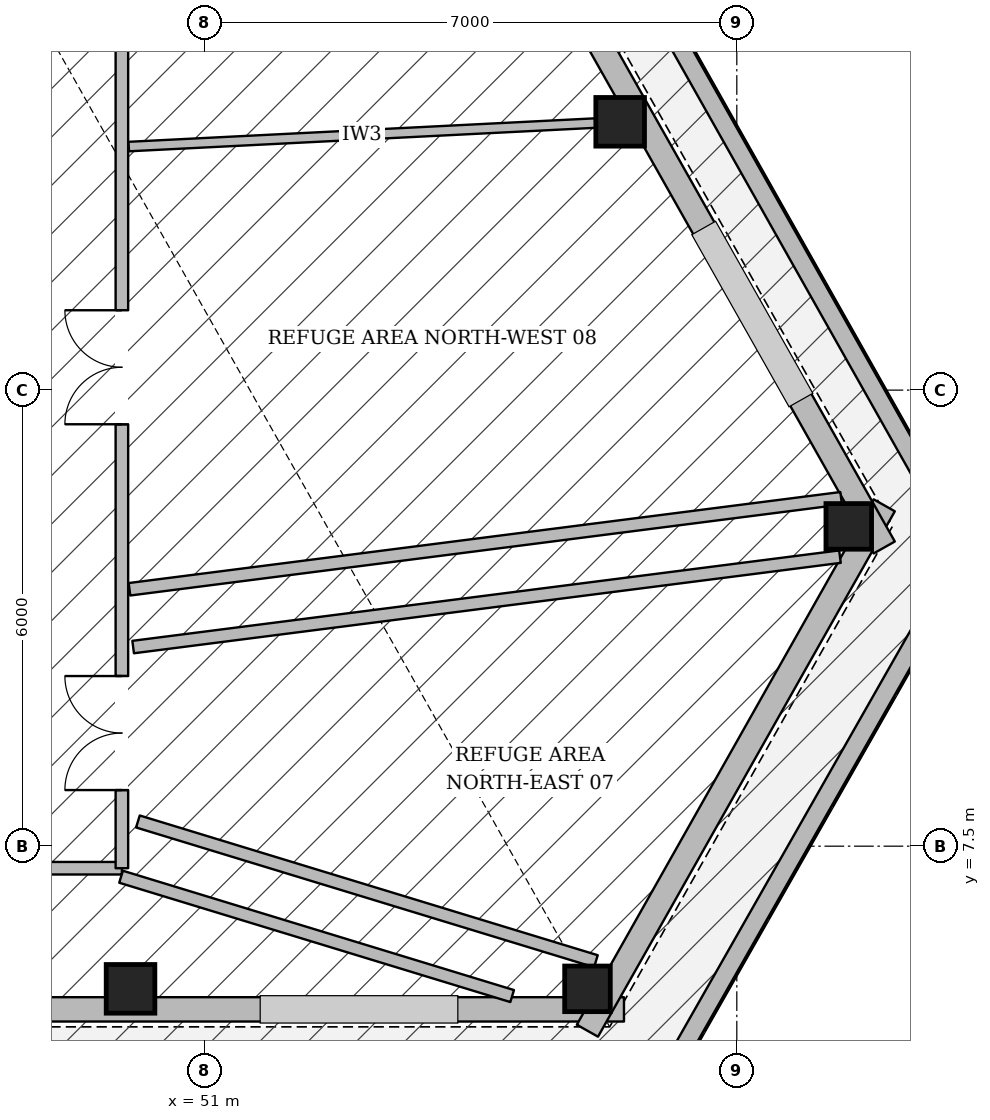
"""IFC4 building model, lengths in metres.
Left out: names, types, materials, properties, quantities, classifications, styles, units other than length and angle.
Written with IfcOpenShell. Run it as: python <this file> out.ifc"""

import sys

from ifc_helpers import new_model, si_unit, direction, frame, frame_2d, origin, origin_2d, place, context, subcontext, project, spatial, rectangle, hollow_rectangle, extrude, element, fill, save


model = new_model("IFC4")
c1 = context("Model", 3, precision=1e-05, world=origin(), true_north=direction((0.0, 1.0)))
c2 = subcontext(c1, "Body", "Model", "MODEL_VIEW")
j1 = project(units=[si_unit("LENGTHUNIT", "METRE"), si_unit("PLANEANGLEUNIT", "RADIAN")], contexts=[c1])
p1 = place(None, origin())
s1 = spatial("IfcSite", under=j1, at=p1, CompositionType="ELEMENT")
p2 = place(p1, origin())
s2 = spatial("IfcBuilding", under=s1, at=p2, CompositionType="ELEMENT")
p3 = place(p2, frame((0.0, 0.0, 234.3)))
s3 = spatial("IfcBuildingStorey", under=s2, at=p3, CompositionType="ELEMENT", Elevation=234.3)
p4 = place(p3, frame((50.024, 5.623, 0.0), z_axis=(0.0, 0.0, 1.0), x_axis=(1.0, 0.0, 0.0)))
e1 = element("IfcColumn", 1, at=p4, inside=s3, PredefinedType="COLUMN", context=c2, shape_type="SweptSolid", body=[
    extrude(hollow_rectangle(XDim=0.64, YDim=0.64, WallThickness=0.028, at=origin_2d()), origin(), (0.0, 0.0, 1.0), 4.96),
])
for number, where, z_axis, x_axis in (
    (2, (56.035, 5.623, 0.0), (0.0, 0.0, 1.0), (1.0, 0.0, 0.0)),
    (3, (59.473, 11.707, 0.0), (0.0, 0.0, 1.0), (1.0, 0.0, 0.0)),
):
    element("IfcColumn", number, at=place(p3, frame(where, z_axis=z_axis, x_axis=x_axis)), inside=s3, PredefinedType="COLUMN", context=c2, shape_type="SweptSolid", body=[
        extrude(hollow_rectangle(XDim=0.6, YDim=0.6, WallThickness=0.028, at=origin_2d()), origin(), (0.0, 0.0, 1.0), 4.96),
    ])
p5 = place(p3, frame((56.465, 17.03, 0.0), z_axis=(0.0, 0.0, 1.0), x_axis=(1.0, 0.0, 0.0)))
e4 = element("IfcColumn", 4, at=p5, inside=s3, PredefinedType="COLUMN", context=c2, shape_type="SweptSolid", body=[
    extrude(hollow_rectangle(XDim=0.64, YDim=0.64, WallThickness=0.028, at=origin_2d()), origin(), (0.0, 0.0, 1.0), 4.96),
])
p6 = place(p3, frame((56.516, 5.353, 0.0), z_axis=(0.0, 0.0, 1.0), x_axis=(-1.0, 0.0, 0.0)))
e5 = element("IfcWall", 5, at=p6, inside=s3, PredefinedType="STANDARD", context=c2, shape_type="SweptSolid", body=[
    extrude(rectangle(XDim=37.031, YDim=0.32, at=frame_2d((18.516, 0.0))), origin(), (0.0, 0.0, 1.0), 3.652),
])
p7 = place(p3, frame((59.94, 11.984, 0.0), z_axis=(0.0, 0.0, 1.0), x_axis=(-0.491920449469, -0.870640150346, 0.0)))
e6 = element("IfcWall", 6, at=p7, inside=s3, PredefinedType="STANDARD", context=c2, shape_type="SweptSolid", body=[
    extrude(rectangle(XDim=7.939, YDim=0.32, at=frame_2d((3.969, 0.0))), origin(), (0.0, 0.0, 1.0), 3.652),
])
p8 = place(p3, frame((41.427, 44.195, 0.0), z_axis=(0.0, 0.0, 1.0), x_axis=(0.491919583937, -0.87064063938, 0.0)))
e7 = element("IfcWall", 7, at=p8, inside=s3, PredefinedType="STANDARD", context=c2, shape_type="SweptSolid", body=[
    extrude(rectangle(XDim=37.633, YDim=0.32, at=frame_2d((18.816, 0.0))), origin(), (0.0, 0.0, 1.0), 3.652),
])
p9 = place(p3, frame((56.976, 4.282, 0.0), z_axis=(0.0, 0.0, 1.0), x_axis=(0.49469634297, 0.869065894079, 0.0)))
e8 = element("IfcWall", 8, at=p9, inside=s3, PredefinedType="PARAPET", context=c2, shape_type="SweptSolid", body=[
    extrude(rectangle(XDim=8.333, YDim=0.24, at=frame_2d((4.167, 0.0))), origin(), (0.0, 0.0, 1.0), 1.25),
])
p10 = place(p3, frame((61.098, 11.212, 0.0), z_axis=(0.0, 0.0, 1.0), x_axis=(-0.491296283938, 0.870992515117, 0.0)))
e9 = element("IfcWall", 9, at=p10, inside=s3, PredefinedType="PARAPET", context=c2, shape_type="SweptSolid", body=[
    extrude(rectangle(XDim=39.283, YDim=0.24, at=frame_2d((19.642, 0.0))), origin(), (0.0, 0.0, 1.0), 1.25),
])
p11 = place(p3, frame((26.09, 7.21, 0.0), z_axis=(0.0, 0.0, 1.0), x_axis=(1.0, 0.0, 0.0)))
e10 = element("IfcWall", 10, at=p11, inside=s3, PredefinedType="PARTITIONING", context=c2, shape_type="SweptSolid", body=[
    extrude(rectangle(XDim=23.82, YDim=0.165, at=frame_2d((11.91, 0.0))), origin(), (0.0, 0.0, 1.0), 4.96),
])
p12 = place(p11, frame((11.16, 0.0, 0.0)))
e11 = element("IfcOpeningElement", 11, at=p12, cuts=e10, PredefinedType="OPENING", context=c2, shape_type="SweptSolid", body=[
    extrude(rectangle(XDim=1.5, YDim=2.25, at=frame_2d((0.75, 1.125))), frame((0.0, 0.093, 0.0), z_axis=(0.0, -1.0, 0.0), x_axis=(1.0, 0.0, 0.0)), (0.0, 0.0, 1.0), 0.185),
])
p13 = place(p3, frame((49.91, 7.21, 0.0), z_axis=(0.0, 0.0, 1.0), x_axis=(0.0, 1.0, 0.0)))
e12 = element("IfcWall", 12, at=p13, inside=s3, PredefinedType="PARTITIONING", context=c2, shape_type="SweptSolid", body=[
    extrude(rectangle(XDim=17.78, YDim=0.165, at=frame_2d((8.89, 0.0))), origin(), (0.0, 0.0, 1.0), 4.699),
])
p14 = place(p13, frame((12.803, 0.0, 0.0)))
e13 = element("IfcOpeningElement", 13, at=p14, cuts=e12, PredefinedType="OPENING", context=c2, shape_type="SweptSolid", body=[
    extrude(rectangle(XDim=1.5, YDim=2.25, at=frame_2d((0.75, 1.125))), frame((0.0, 0.093, 0.0), z_axis=(0.0, -1.0, 0.0), x_axis=(1.0, 0.0, 0.0)), (0.0, 0.0, 1.0), 0.185),
])
p15 = place(p13, frame((1.028, 0.0, 0.0)))
e14 = element("IfcOpeningElement", 14, at=p15, cuts=e12, PredefinedType="OPENING", context=c2, shape_type="SweptSolid", body=[
    extrude(rectangle(XDim=1.5, YDim=2.25, at=frame_2d((0.75, 1.125))), frame((0.0, 0.093, 0.0), z_axis=(0.0, -1.0, 0.0), x_axis=(1.0, 0.0, 0.0)), (0.0, 0.0, 1.0), 0.185),
])
p16 = place(p13, frame((5.841, 0.0, 0.0)))
e15 = element("IfcOpeningElement", 15, at=p16, cuts=e12, PredefinedType="OPENING", context=c2, shape_type="SweptSolid", body=[
    extrude(rectangle(XDim=1.5, YDim=2.25, at=frame_2d((0.75, 1.125))), frame((0.0, 0.093, 0.0), z_axis=(0.0, -1.0, 0.0), x_axis=(1.0, 0.0, 0.0)), (0.0, 0.0, 1.0), 0.185),
])
p17 = place(p3, frame((50.121, 7.825, 0.0), z_axis=(0.0, 0.0, 1.0), x_axis=(0.956485946224, -0.291778399948, 0.0)))
e16 = element("IfcWall", 16, at=p17, inside=s3, PredefinedType="PARTITIONING", context=c2, shape_type="SweptSolid", body=[
    extrude(rectangle(XDim=6.3, YDim=0.165, at=frame_2d((3.15, 0.0))), origin(), (0.0, 0.0, 1.0), 4.96),
])
p18 = place(p3, frame((49.899, 7.098, 0.0), z_axis=(0.0, 0.0, 1.0), x_axis=(0.956485702971, -0.291779197362, 0.0)))
e17 = element("IfcWall", 17, at=p18, inside=s3, PredefinedType="PARTITIONING", context=c2, shape_type="SweptSolid", body=[
    extrude(rectangle(XDim=5.379, YDim=0.165, at=frame_2d((2.69, 0.0))), origin(), (0.0, 0.0, 1.0), 3.655),
])
p19 = place(p3, frame((50.01, 10.88, 0.0), z_axis=(0.0, 0.0, 1.0), x_axis=(0.991919681507, 0.126867432537, 0.0)))
e18 = element("IfcWall", 18, at=p19, inside=s3, PredefinedType="PARTITIONING", context=c2, shape_type="SweptSolid", body=[
    extrude(rectangle(XDim=9.439, YDim=0.165, at=frame_2d((4.719, 0.0))), origin(), (0.0, 0.0, 1.0), 4.96),
])
p20 = place(p3, frame((50.058, 10.12, 0.0), z_axis=(0.0, 0.0, 1.0), x_axis=(0.991918429115, 0.126877224045, 0.0)))
e19 = element("IfcWall", 19, at=p20, inside=s3, PredefinedType="PARTITIONING", context=c2, shape_type="SweptSolid", body=[
    extrude(rectangle(XDim=9.375, YDim=0.165, at=frame_2d((4.688, 0.0))), origin(), (0.0, 0.0, 1.0), 4.699),
])
p21 = place(p3, frame((50.0, 16.704, 0.0), z_axis=(0.0, 0.0, 1.0), x_axis=(0.998734141149, 0.050300251529, 0.0)))
e20 = element("IfcWall", 20, at=p21, inside=s3, PredefinedType="PARTITIONING", context=c2, shape_type="SweptSolid", body=[
    extrude(rectangle(XDim=6.145, YDim=0.125, at=frame_2d((3.072, 0.0))), origin(), (0.0, 0.0, 1.0), 3.655),
])
p22 = place(p15, origin())
e21 = element("IfcDoor", 21, at=p22, inside=s3, OperationType="DOUBLE_DOOR_SINGLE_SWING", PredefinedType="DOOR", context=c2, shape_type="SweptSolid", body=[
    extrude(rectangle(XDim=1.5, YDim=2.25, at=frame_2d((0.75, 1.125))), frame((0.0, 0.025, 0.0), z_axis=(0.0, -1.0, 0.0), x_axis=(1.0, 0.0, 0.0)), (0.0, 0.0, 1.0), 0.05),
])
fill(e14, e21)
p23 = place(p16, origin())
e22 = element("IfcDoor", 22, at=p23, inside=s3, OperationType="DOUBLE_DOOR_SINGLE_SWING", PredefinedType="DOOR", context=c2, shape_type="SweptSolid", body=[
    extrude(rectangle(XDim=1.5, YDim=2.25, at=frame_2d((0.75, 1.125))), frame((0.0, 0.025, 0.0), z_axis=(0.0, -1.0, 0.0), x_axis=(1.0, 0.0, 0.0)), (0.0, 0.0, 1.0), 0.05),
])
fill(e15, e22)
save(model, sys.argv[1])
